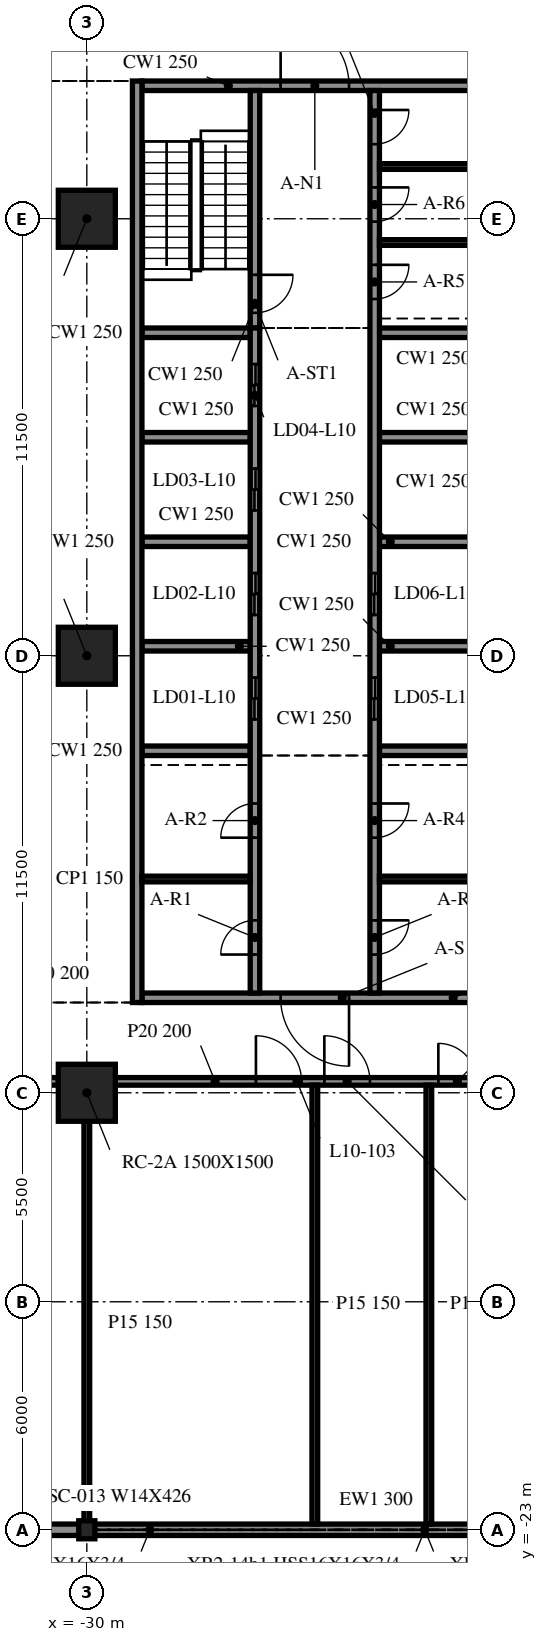
"""IFC4 building model, lengths in metres.
Left out: names, types, materials, properties, quantities, classifications, styles, units other than length and angle.
Written with IfcOpenShell. Run it as: python <this file> out.ifc"""

import sys

from ifc_helpers import new_model, si_unit, direction, frame, frame_2d, origin, origin_2d, place, context, subcontext, project, spatial, rectangle, i_section, extrude, element, fill, save


model = new_model("IFC4")
c1 = context("Model", 3, precision=1e-05, world=origin(), true_north=direction((0.0, 1.0)))
c2 = subcontext(c1, "Body", "Model", "MODEL_VIEW")
j1 = project(units=[si_unit("LENGTHUNIT", "METRE"), si_unit("PLANEANGLEUNIT", "RADIAN")], contexts=[c1])
p1 = place(None, origin())
s1 = spatial("IfcSite", under=j1, at=p1, CompositionType="ELEMENT")
p2 = place(p1, origin())
s2 = spatial("IfcBuilding", under=s1, at=p2, CompositionType="ELEMENT")
p3 = place(p2, frame((0.0, 0.0, 46.0)))
s3 = spatial("IfcBuildingStorey", under=s2, at=p3, CompositionType="ELEMENT", Elevation=46.0)
for number, where, z_axis, x_axis in (
    (1, (-30.0, -11.5, -0.34), (0.0, 0.0, 1.0), (1.0, 0.0, 0.0)),
    (2, (-30.0, 0.0, -0.34), (0.0, 0.0, 1.0), (1.0, 0.0, 0.0)),
    (3, (-30.0, 11.5, -0.34), (0.0, 0.0, 1.0), (1.0, 0.0, 0.0)),
):
    element("IfcColumn", number, at=place(p3, frame(where, z_axis=z_axis, x_axis=x_axis)), inside=s3, PredefinedType="COLUMN", context=c2, shape_type="SweptSolid", body=[
        extrude(rectangle(XDim=1.5, YDim=1.5, at=origin_2d()), origin(), (0.0, 0.0, 1.0), 4.3),
    ])
p4 = place(p3, frame((-30.0, -23.0, -0.34), z_axis=(0.0, 0.0, 1.0), x_axis=(1.0, 0.0, 0.0)))
e4 = element("IfcColumn", 4, at=p4, inside=s3, PredefinedType="COLUMN", context=c2, shape_type="SweptSolid", body=[
    extrude(i_section(OverallWidth=0.424, OverallDepth=0.475, WebThickness=0.048, FlangeThickness=0.077, at=origin_2d()), origin(), (0.0, 0.0, 1.0), 4.3),
])
p5 = place(p3, frame((-36.0, -23.0, 0.0), z_axis=(0.0, 0.0, 1.0), x_axis=(1.0, 0.0, 0.0)))
e5 = element("IfcWall", 5, at=p5, inside=s3, PredefinedType="NOTDEFINED", context=c2, shape_type="SweptSolid", body=[
    extrude(rectangle(XDim=5.976, YDim=0.3, at=frame_2d((2.988, 0.0))), origin(), (0.0, 0.0, 1.0), 3.203),
])
p6 = place(p3, frame((-29.976, -23.0, 0.0), z_axis=(0.0, 0.0, 1.0), x_axis=(1.0, 0.0, 0.0)))
e6 = element("IfcWall", 6, at=p6, inside=s3, PredefinedType="NOTDEFINED", context=c2, shape_type="SweptSolid", body=[
    extrude(rectangle(XDim=11.952, YDim=0.3, at=frame_2d((5.976, 0.0))), origin(), (0.0, 0.0, 1.0), 3.203),
])
p7 = place(p3, frame((-28.675, 15.125, 0.0), z_axis=(0.0, 0.0, 1.0), x_axis=(0.0, -1.0, 0.0)))
e7 = element("IfcWall", 7, at=p7, inside=s3, PredefinedType="SOLIDWALL", context=c2, shape_type="SweptSolid", body=[
    extrude(rectangle(XDim=24.25, YDim=0.25, at=frame_2d((12.125, 0.0))), origin(), (0.0, 0.0, 1.0), 3.96),
])
p8 = place(p3, frame((-19.45, -9.0, 0.0), z_axis=(0.0, 0.0, 1.0), x_axis=(-1.0, 0.0, 0.0)))
e8 = element("IfcWall", 8, at=p8, inside=s3, PredefinedType="SOLIDWALL", context=c2, shape_type="SweptSolid", body=[
    extrude(rectangle(XDim=9.1, YDim=0.25, at=frame_2d((4.55, 0.0))), origin(), (0.0, 0.0, 1.0), 3.96),
])
p9 = place(p8, frame((3.65, 0.0, 0.0)))
e9 = element("IfcOpeningElement", 9, at=p9, cuts=e8, PredefinedType="OPENING", context=c2, shape_type="SweptSolid", body=[
    extrude(rectangle(XDim=1.8, YDim=2.1, at=frame_2d((0.9, 1.05))), frame((0.0, 0.135, 0.0), z_axis=(0.0, -1.0, 0.0), x_axis=(1.0, 0.0, 0.0)), (0.0, 0.0, 1.0), 0.27),
])
p10 = place(p3, frame((-28.55, 15.0, 0.0), z_axis=(0.0, 0.0, 1.0), x_axis=(1.0, 0.0, 0.0)))
e10 = element("IfcWall", 10, at=p10, inside=s3, PredefinedType="SOLIDWALL", context=c2, shape_type="SweptSolid", body=[
    extrude(rectangle(XDim=9.1, YDim=0.25, at=frame_2d((4.55, 0.0))), origin(), (0.0, 0.0, 1.0), 3.96),
])
p11 = place(p10, frame((3.65, 0.0, 0.0)))
e11 = element("IfcOpeningElement", 11, at=p11, cuts=e10, PredefinedType="OPENING", context=c2, shape_type="SweptSolid", body=[
    extrude(rectangle(XDim=1.8, YDim=2.1, at=frame_2d((0.9, 1.05))), frame((0.0, 0.135, 0.0), z_axis=(0.0, -1.0, 0.0), x_axis=(1.0, 0.0, 0.0)), (0.0, 0.0, 1.0), 0.27),
])
p12 = place(p3, frame((-25.575, -8.875, 0.0), z_axis=(0.0, 0.0, 1.0), x_axis=(0.0, 1.0, 0.0)))
e12 = element("IfcWall", 12, at=p12, inside=s3, PredefinedType="SOLIDWALL", context=c2, shape_type="SweptSolid", body=[
    extrude(rectangle(XDim=17.5, YDim=0.25, at=frame_2d((8.75, 0.0))), origin(), (0.0, 0.0, 1.0), 3.96),
])
p13 = place(p12, frame((7.2, 0.0, 0.0)))
e13 = element("IfcOpeningElement", 13, at=p13, cuts=e12, PredefinedType="OPENING", context=c2, shape_type="SweptSolid", body=[
    extrude(rectangle(XDim=1.1, YDim=2.1, at=frame_2d((0.55, 1.05))), frame((0.0, 0.135, 0.0), z_axis=(0.0, -1.0, 0.0), x_axis=(1.0, 0.0, 0.0)), (0.0, 0.0, 1.0), 0.27),
])
p14 = place(p12, frame((9.95, 0.0, 0.0)))
e14 = element("IfcOpeningElement", 14, at=p14, cuts=e12, PredefinedType="OPENING", context=c2, shape_type="SweptSolid", body=[
    extrude(rectangle(XDim=1.1, YDim=2.1, at=frame_2d((0.55, 1.05))), frame((0.0, 0.135, 0.0), z_axis=(0.0, -1.0, 0.0), x_axis=(1.0, 0.0, 0.0)), (0.0, 0.0, 1.0), 0.27),
])
p15 = place(p12, frame((12.7, 0.0, 0.0)))
e15 = element("IfcOpeningElement", 15, at=p15, cuts=e12, PredefinedType="OPENING", context=c2, shape_type="SweptSolid", body=[
    extrude(rectangle(XDim=1.1, YDim=2.1, at=frame_2d((0.55, 1.05))), frame((0.0, 0.135, 0.0), z_axis=(0.0, -1.0, 0.0), x_axis=(1.0, 0.0, 0.0)), (0.0, 0.0, 1.0), 0.27),
])
p16 = place(p12, frame((15.45, 0.0, 0.0)))
e16 = element("IfcOpeningElement", 16, at=p16, cuts=e12, PredefinedType="OPENING", context=c2, shape_type="SweptSolid", body=[
    extrude(rectangle(XDim=1.1, YDim=2.1, at=frame_2d((0.55, 1.05))), frame((0.0, 0.135, 0.0), z_axis=(0.0, -1.0, 0.0), x_axis=(1.0, 0.0, 0.0)), (0.0, 0.0, 1.0), 0.27),
])
p17 = place(p12, frame((1.012, 0.0, 0.0)))
e17 = element("IfcOpeningElement", 17, at=p17, cuts=e12, PredefinedType="OPENING", context=c2, shape_type="SweptSolid", body=[
    extrude(rectangle(XDim=0.9, YDim=2.1, at=frame_2d((0.45, 1.05))), frame((0.0, 0.135, 0.0), z_axis=(0.0, -1.0, 0.0), x_axis=(1.0, 0.0, 0.0)), (0.0, 0.0, 1.0), 0.27),
])
p18 = place(p12, frame((4.087, 0.0, 0.0)))
e18 = element("IfcOpeningElement", 18, at=p18, cuts=e12, PredefinedType="OPENING", context=c2, shape_type="SweptSolid", body=[
    extrude(rectangle(XDim=0.9, YDim=2.1, at=frame_2d((0.45, 1.05))), frame((0.0, 0.135, 0.0), z_axis=(0.0, -1.0, 0.0), x_axis=(1.0, 0.0, 0.0)), (0.0, 0.0, 1.0), 0.27),
])
p19 = place(p3, frame((-25.575, 14.875, 0.0), z_axis=(0.0, 0.0, 1.0), x_axis=(0.0, -1.0, 0.0)))
e19 = element("IfcWall", 19, at=p19, inside=s3, PredefinedType="SOLIDWALL", context=c2, shape_type="SweptSolid", body=[
    extrude(rectangle(XDim=6.25, YDim=0.25, at=frame_2d((3.125, 0.0))), origin(), (0.0, 0.0, 1.0), 3.96),
])
p20 = place(p19, frame((4.85, 0.0, 0.0)))
e20 = element("IfcOpeningElement", 20, at=p20, cuts=e19, PredefinedType="OPENING", context=c2, shape_type="SweptSolid", body=[
    extrude(rectangle(XDim=1.0, YDim=2.1, at=frame_2d((0.5, 1.05))), frame((0.0, 0.135, 0.0), z_axis=(0.0, -1.0, 0.0), x_axis=(1.0, 0.0, 0.0)), (0.0, 0.0, 1.0), 0.27),
])
p21 = place(p3, frame((-22.425, 14.875, 0.0), z_axis=(0.0, 0.0, 1.0), x_axis=(0.0, -1.0, 0.0)))
e21 = element("IfcWall", 21, at=p21, inside=s3, PredefinedType="SOLIDWALL", context=c2, shape_type="SweptSolid", body=[
    extrude(rectangle(XDim=23.75, YDim=0.25, at=frame_2d((11.875, 0.0))), origin(), (0.0, 0.0, 1.0), 3.96),
])
p22 = place(p21, frame((15.45, 0.0, 0.0)))
e22 = element("IfcOpeningElement", 22, at=p22, cuts=e21, PredefinedType="OPENING", context=c2, shape_type="SweptSolid", body=[
    extrude(rectangle(XDim=1.1, YDim=2.1, at=frame_2d((0.55, 1.05))), frame((0.0, 0.135, 0.0), z_axis=(0.0, -1.0, 0.0), x_axis=(1.0, 0.0, 0.0)), (0.0, 0.0, 1.0), 0.27),
])
p23 = place(p21, frame((12.7, 0.0, 0.0)))
e23 = element("IfcOpeningElement", 23, at=p23, cuts=e21, PredefinedType="OPENING", context=c2, shape_type="SweptSolid", body=[
    extrude(rectangle(XDim=1.1, YDim=2.1, at=frame_2d((0.55, 1.05))), frame((0.0, 0.135, 0.0), z_axis=(0.0, -1.0, 0.0), x_axis=(1.0, 0.0, 0.0)), (0.0, 0.0, 1.0), 0.27),
])
p24 = place(p21, frame((21.837, 0.0, 0.0)))
e24 = element("IfcOpeningElement", 24, at=p24, cuts=e21, PredefinedType="OPENING", context=c2, shape_type="SweptSolid", body=[
    extrude(rectangle(XDim=0.9, YDim=2.1, at=frame_2d((0.45, 1.05))), frame((0.0, 0.135, 0.0), z_axis=(0.0, -1.0, 0.0), x_axis=(1.0, 0.0, 0.0)), (0.0, 0.0, 1.0), 0.27),
])
p25 = place(p21, frame((18.762, 0.0, 0.0)))
e25 = element("IfcOpeningElement", 25, at=p25, cuts=e21, PredefinedType="OPENING", context=c2, shape_type="SweptSolid", body=[
    extrude(rectangle(XDim=0.9, YDim=2.1, at=frame_2d((0.45, 1.05))), frame((0.0, 0.135, 0.0), z_axis=(0.0, -1.0, 0.0), x_axis=(1.0, 0.0, 0.0)), (0.0, 0.0, 1.0), 0.27),
])
p26 = place(p21, frame((4.587, 0.0, 0.0)))
e26 = element("IfcOpeningElement", 26, at=p26, cuts=e21, PredefinedType="OPENING", context=c2, shape_type="SweptSolid", body=[
    extrude(rectangle(XDim=0.9, YDim=2.1, at=frame_2d((0.45, 1.05))), frame((0.0, 0.135, 0.0), z_axis=(0.0, -1.0, 0.0), x_axis=(1.0, 0.0, 0.0)), (0.0, 0.0, 1.0), 0.27),
])
p27 = place(p21, frame((2.55, 0.0, 0.0)))
e27 = element("IfcOpeningElement", 27, at=p27, cuts=e21, PredefinedType="OPENING", context=c2, shape_type="SweptSolid", body=[
    extrude(rectangle(XDim=0.9, YDim=2.1, at=frame_2d((0.45, 1.05))), frame((0.0, 0.135, 0.0), z_axis=(0.0, -1.0, 0.0), x_axis=(1.0, 0.0, 0.0)), (0.0, 0.0, 1.0), 0.27),
])
p28 = place(p21, frame((0.512, 0.0, 0.0)))
e28 = element("IfcOpeningElement", 28, at=p28, cuts=e21, PredefinedType="OPENING", context=c2, shape_type="SweptSolid", body=[
    extrude(rectangle(XDim=0.9, YDim=2.1, at=frame_2d((0.45, 1.05))), frame((0.0, 0.135, 0.0), z_axis=(0.0, -1.0, 0.0), x_axis=(1.0, 0.0, 0.0)), (0.0, 0.0, 1.0), 0.27),
])
for number, where, z_axis, x_axis in (
    (29, (-28.55, -2.5, 0.0), (0.0, 0.0, 1.0), (1.0, 0.0, 0.0)),
    (30, (-28.55, 0.25, 0.0), (0.0, 0.0, 1.0), (1.0, 0.0, 0.0)),
    (31, (-28.55, 3.0, 0.0), (0.0, 0.0, 1.0), (1.0, 0.0, 0.0)),
    (32, (-28.55, 5.75, 0.0), (0.0, 0.0, 1.0), (1.0, 0.0, 0.0)),
    (33, (-28.55, 8.5, 0.0), (0.0, 0.0, 1.0), (1.0, 0.0, 0.0)),
    (34, (-22.3, -2.5, 0.0), (0.0, 0.0, 1.0), (1.0, 0.0, 0.0)),
    (35, (-22.3, 0.25, 0.0), (0.0, 0.0, 1.0), (1.0, 0.0, 0.0)),
    (36, (-22.3, 3.0, 0.0), (0.0, 0.0, 1.0), (1.0, 0.0, 0.0)),
    (37, (-22.3, 5.75, 0.0), (0.0, 0.0, 1.0), (1.0, 0.0, 0.0)),
    (38, (-22.3, 8.5, 0.0), (0.0, 0.0, 1.0), (1.0, 0.0, 0.0)),
):
    element("IfcWall", number, at=place(p3, frame(where, z_axis=z_axis, x_axis=x_axis)), inside=s3, PredefinedType="SOLIDWALL", context=c2, shape_type="SweptSolid", body=[
        extrude(rectangle(XDim=2.85, YDim=0.25, at=frame_2d((1.425, 0.0))), origin(), (0.0, 0.0, 1.0), 3.96),
    ])
for number, where, z_axis, x_axis in (
    (39, (-28.55, -5.875, 0.0), (0.0, 0.0, 1.0), (1.0, 0.0, 0.0)),
    (40, (-22.3, -5.875, 0.0), (0.0, 0.0, 1.0), (1.0, 0.0, 0.0)),
    (41, (-22.3, 10.875, 0.0), (0.0, 0.0, 1.0), (1.0, 0.0, 0.0)),
    (42, (-22.3, 12.875, 0.0), (0.0, 0.0, 1.0), (1.0, 0.0, 0.0)),
):
    element("IfcWall", number, at=place(p3, frame(where, z_axis=z_axis, x_axis=x_axis)), inside=s3, PredefinedType="PARTITIONING", context=c2, shape_type="SweptSolid", body=[
        extrude(rectangle(XDim=2.85, YDim=0.15, at=frame_2d((1.425, 0.0))), origin(), (0.0, 0.0, 1.0), 3.96),
    ])
p29 = place(p3, frame((-41.25, -11.2, 0.0), z_axis=(0.0, 0.0, 1.0), x_axis=(1.0, 0.0, 0.0)))
e43 = element("IfcWall", 43, at=p29, inside=s3, PredefinedType="PARTITIONING", context=c2, shape_type="SweptSolid", body=[
    extrude(rectangle(XDim=10.5, YDim=0.2, at=frame_2d((5.25, 0.0))), origin(), (0.0, 0.0, 1.0), 3.96),
])
p30 = place(p29, frame((3.7, 0.0, 0.0)))
e44 = element("IfcOpeningElement", 44, at=p30, cuts=e43, PredefinedType="OPENING", context=c2, shape_type="SweptSolid", body=[
    extrude(rectangle(XDim=1.2, YDim=2.1, at=frame_2d((0.6, 1.05))), frame((0.0, 0.11, 0.0), z_axis=(0.0, -1.0, 0.0), x_axis=(1.0, 0.0, 0.0)), (0.0, 0.0, 1.0), 0.22),
])
p31 = place(p29, frame((5.5, 0.0, 0.0)))
e45 = element("IfcOpeningElement", 45, at=p31, cuts=e43, PredefinedType="OPENING", context=c2, shape_type="SweptSolid", body=[
    extrude(rectangle(XDim=1.0, YDim=2.1, at=frame_2d((0.5, 1.05))), frame((0.0, 0.11, 0.0), z_axis=(0.0, -1.0, 0.0), x_axis=(1.0, 0.0, 0.0)), (0.0, 0.0, 1.0), 0.22),
])
p32 = place(p3, frame((-29.25, -11.2, 0.0), z_axis=(0.0, 0.0, 1.0), x_axis=(1.0, 0.0, 0.0)))
e46 = element("IfcWall", 46, at=p32, inside=s3, PredefinedType="PARTITIONING", context=c2, shape_type="SweptSolid", body=[
    extrude(rectangle(XDim=10.5, YDim=0.2, at=frame_2d((5.25, 0.0))), origin(), (0.0, 0.0, 1.0), 3.96),
])
p33 = place(p32, frame((3.7, 0.0, 0.0)))
e47 = element("IfcOpeningElement", 47, at=p33, cuts=e46, PredefinedType="OPENING", context=c2, shape_type="SweptSolid", body=[
    extrude(rectangle(XDim=1.2, YDim=2.1, at=frame_2d((0.6, 1.05))), frame((0.0, 0.11, 0.0), z_axis=(0.0, -1.0, 0.0), x_axis=(1.0, 0.0, 0.0)), (0.0, 0.0, 1.0), 0.22),
])
p34 = place(p32, frame((5.5, 0.0, 0.0)))
e48 = element("IfcOpeningElement", 48, at=p34, cuts=e46, PredefinedType="OPENING", context=c2, shape_type="SweptSolid", body=[
    extrude(rectangle(XDim=1.2, YDim=2.1, at=frame_2d((0.6, 1.05))), frame((0.0, 0.11, 0.0), z_axis=(0.0, -1.0, 0.0), x_axis=(1.0, 0.0, 0.0)), (0.0, 0.0, 1.0), 0.22),
])
p35 = place(p32, frame((8.5, 0.0, 0.0)))
e49 = element("IfcOpeningElement", 49, at=p35, cuts=e46, PredefinedType="OPENING", context=c2, shape_type="SweptSolid", body=[
    extrude(rectangle(XDim=1.0, YDim=2.1, at=frame_2d((0.5, 1.05))), frame((0.0, 0.11, 0.0), z_axis=(0.0, -1.0, 0.0), x_axis=(1.0, 0.0, 0.0)), (0.0, 0.0, 1.0), 0.22),
])
p36 = place(p3, frame((-30.0, -22.85, 0.0), z_axis=(0.0, 0.0, 1.0), x_axis=(0.0, 1.0, 0.0)))
e50 = element("IfcWall", 50, at=p36, inside=s3, PredefinedType="PARTITIONING", context=c2, shape_type="SweptSolid", body=[
    extrude(rectangle(XDim=10.6, YDim=0.15, at=frame_2d((5.3, 0.0))), origin(), (0.0, 0.0, 1.0), 3.96),
])
for number, where, z_axis, x_axis in (
    (51, (-24.0, -22.85, 0.0), (0.0, 0.0, 1.0), (0.0, 1.0, 0.0)),
    (52, (-21.0, -22.85, 0.0), (0.0, 0.0, 1.0), (0.0, 1.0, 0.0)),
):
    element("IfcWall", number, at=place(p3, frame(where, z_axis=z_axis, x_axis=x_axis)), inside=s3, PredefinedType="PARTITIONING", context=c2, shape_type="SweptSolid", body=[
        extrude(rectangle(XDim=11.55, YDim=0.15, at=frame_2d((5.775, 0.0))), origin(), (0.0, 0.0, 1.0), 3.96),
    ])
p37 = place(p9, origin())
e53 = element("IfcDoor", 53, at=p37, inside=s3, OperationType="DOUBLE_DOOR_SINGLE_SWING", PredefinedType="DOOR", context=c2, shape_type="SweptSolid", body=[
    extrude(rectangle(XDim=1.8, YDim=2.1, at=frame_2d((0.9, 1.05))), frame((0.0, 0.025, 0.0), z_axis=(0.0, -1.0, 0.0), x_axis=(1.0, 0.0, 0.0)), (0.0, 0.0, 1.0), 0.05),
])
fill(e9, e53)
p38 = place(p11, origin())
e54 = element("IfcDoor", 54, at=p38, inside=s3, OperationType="DOUBLE_DOOR_SINGLE_SWING", PredefinedType="DOOR", context=c2, shape_type="SweptSolid", body=[
    extrude(rectangle(XDim=1.8, YDim=2.1, at=frame_2d((0.9, 1.05))), frame((0.0, 0.025, 0.0), z_axis=(0.0, -1.0, 0.0), x_axis=(1.0, 0.0, 0.0)), (0.0, 0.0, 1.0), 0.05),
])
fill(e11, e54)
p39 = place(p22, origin())
e55 = element("IfcDoor", 55, at=p39, inside=s3, OperationType="DOUBLE_DOOR_SLIDING", PredefinedType="DOOR", context=c2, shape_type="SweptSolid", body=[
    extrude(rectangle(XDim=1.1, YDim=2.1, at=frame_2d((0.55, 1.05))), frame((0.0, 0.025, 0.0), z_axis=(0.0, -1.0, 0.0), x_axis=(1.0, 0.0, 0.0)), (0.0, 0.0, 1.0), 0.05),
])
fill(e22, e55)
p40 = place(p23, origin())
e56 = element("IfcDoor", 56, at=p40, inside=s3, OperationType="DOUBLE_DOOR_SLIDING", PredefinedType="DOOR", context=c2, shape_type="SweptSolid", body=[
    extrude(rectangle(XDim=1.1, YDim=2.1, at=frame_2d((0.55, 1.05))), frame((0.0, 0.025, 0.0), z_axis=(0.0, -1.0, 0.0), x_axis=(1.0, 0.0, 0.0)), (0.0, 0.0, 1.0), 0.05),
])
fill(e23, e56)
p41 = place(p13, origin())
e57 = element("IfcDoor", 57, at=p41, inside=s3, OperationType="DOUBLE_DOOR_SLIDING", PredefinedType="DOOR", context=c2, shape_type="SweptSolid", body=[
    extrude(rectangle(XDim=1.1, YDim=2.1, at=frame_2d((0.55, 1.05))), frame((0.0, 0.025, 0.0), z_axis=(0.0, -1.0, 0.0), x_axis=(1.0, 0.0, 0.0)), (0.0, 0.0, 1.0), 0.05),
])
fill(e13, e57)
p42 = place(p14, origin())
e58 = element("IfcDoor", 58, at=p42, inside=s3, OperationType="DOUBLE_DOOR_SLIDING", PredefinedType="DOOR", context=c2, shape_type="SweptSolid", body=[
    extrude(rectangle(XDim=1.1, YDim=2.1, at=frame_2d((0.55, 1.05))), frame((0.0, 0.025, 0.0), z_axis=(0.0, -1.0, 0.0), x_axis=(1.0, 0.0, 0.0)), (0.0, 0.0, 1.0), 0.05),
])
fill(e14, e58)
p43 = place(p15, origin())
e59 = element("IfcDoor", 59, at=p43, inside=s3, OperationType="DOUBLE_DOOR_SLIDING", PredefinedType="DOOR", context=c2, shape_type="SweptSolid", body=[
    extrude(rectangle(XDim=1.1, YDim=2.1, at=frame_2d((0.55, 1.05))), frame((0.0, 0.025, 0.0), z_axis=(0.0, -1.0, 0.0), x_axis=(1.0, 0.0, 0.0)), (0.0, 0.0, 1.0), 0.05),
])
fill(e15, e59)
p44 = place(p16, origin())
e60 = element("IfcDoor", 60, at=p44, inside=s3, OperationType="DOUBLE_DOOR_SLIDING", PredefinedType="DOOR", context=c2, shape_type="SweptSolid", body=[
    extrude(rectangle(XDim=1.1, YDim=2.1, at=frame_2d((0.55, 1.05))), frame((0.0, 0.025, 0.0), z_axis=(0.0, -1.0, 0.0), x_axis=(1.0, 0.0, 0.0)), (0.0, 0.0, 1.0), 0.05),
])
fill(e16, e60)
p45 = place(p17, origin())
e61 = element("IfcDoor", 61, at=p45, inside=s3, OperationType="SINGLE_SWING_LEFT", PredefinedType="DOOR", context=c2, shape_type="SweptSolid", body=[
    extrude(rectangle(XDim=0.9, YDim=2.1, at=frame_2d((0.45, 1.05))), frame((0.0, 0.025, 0.0), z_axis=(0.0, -1.0, 0.0), x_axis=(1.0, 0.0, 0.0)), (0.0, 0.0, 1.0), 0.05),
])
fill(e17, e61)
p46 = place(p18, origin())
e62 = element("IfcDoor", 62, at=p46, inside=s3, OperationType="SINGLE_SWING_RIGHT", PredefinedType="DOOR", context=c2, shape_type="SweptSolid", body=[
    extrude(rectangle(XDim=0.9, YDim=2.1, at=frame_2d((0.45, 1.05))), frame((0.0, 0.025, 0.0), z_axis=(0.0, -1.0, 0.0), x_axis=(1.0, 0.0, 0.0)), (0.0, 0.0, 1.0), 0.05),
])
fill(e18, e62)
p47 = place(p24, origin())
e63 = element("IfcDoor", 63, at=p47, inside=s3, OperationType="SINGLE_SWING_LEFT", PredefinedType="DOOR", context=c2, shape_type="SweptSolid", body=[
    extrude(rectangle(XDim=0.9, YDim=2.1, at=frame_2d((0.45, 1.05))), frame((0.0, 0.025, 0.0), z_axis=(0.0, -1.0, 0.0), x_axis=(1.0, 0.0, 0.0)), (0.0, 0.0, 1.0), 0.05),
])
fill(e24, e63)
p48 = place(p25, origin())
e64 = element("IfcDoor", 64, at=p48, inside=s3, OperationType="SINGLE_SWING_RIGHT", PredefinedType="DOOR", context=c2, shape_type="SweptSolid", body=[
    extrude(rectangle(XDim=0.9, YDim=2.1, at=frame_2d((0.45, 1.05))), frame((0.0, 0.025, 0.0), z_axis=(0.0, -1.0, 0.0), x_axis=(1.0, 0.0, 0.0)), (0.0, 0.0, 1.0), 0.05),
])
fill(e25, e64)
p49 = place(p26, origin())
e65 = element("IfcDoor", 65, at=p49, inside=s3, OperationType="SINGLE_SWING_LEFT", PredefinedType="DOOR", context=c2, shape_type="SweptSolid", body=[
    extrude(rectangle(XDim=0.9, YDim=2.1, at=frame_2d((0.45, 1.05))), frame((0.0, 0.025, 0.0), z_axis=(0.0, -1.0, 0.0), x_axis=(1.0, 0.0, 0.0)), (0.0, 0.0, 1.0), 0.05),
])
fill(e26, e65)
p50 = place(p27, origin())
e66 = element("IfcDoor", 66, at=p50, inside=s3, OperationType="SINGLE_SWING_RIGHT", PredefinedType="DOOR", context=c2, shape_type="SweptSolid", body=[
    extrude(rectangle(XDim=0.9, YDim=2.1, at=frame_2d((0.45, 1.05))), frame((0.0, 0.025, 0.0), z_axis=(0.0, -1.0, 0.0), x_axis=(1.0, 0.0, 0.0)), (0.0, 0.0, 1.0), 0.05),
])
fill(e27, e66)
p51 = place(p28, origin())
e67 = element("IfcDoor", 67, at=p51, inside=s3, OperationType="SINGLE_SWING_LEFT", PredefinedType="DOOR", context=c2, shape_type="SweptSolid", body=[
    extrude(rectangle(XDim=0.9, YDim=2.1, at=frame_2d((0.45, 1.05))), frame((0.0, 0.025, 0.0), z_axis=(0.0, -1.0, 0.0), x_axis=(1.0, 0.0, 0.0)), (0.0, 0.0, 1.0), 0.05),
])
fill(e28, e67)
p52 = place(p20, origin())
e68 = element("IfcDoor", 68, at=p52, inside=s3, OperationType="SINGLE_SWING_RIGHT", PredefinedType="DOOR", context=c2, shape_type="SweptSolid", body=[
    extrude(rectangle(XDim=1.0, YDim=2.1, at=frame_2d((0.5, 1.05))), frame((0.0, 0.025, 0.0), z_axis=(0.0, -1.0, 0.0), x_axis=(1.0, 0.0, 0.0)), (0.0, 0.0, 1.0), 0.05),
])
fill(e20, e68)
p53 = place(p33, origin())
e69 = element("IfcDoor", 69, at=p53, inside=s3, OperationType="SINGLE_SWING_RIGHT", PredefinedType="DOOR", context=c2, shape_type="SweptSolid", body=[
    extrude(rectangle(XDim=1.2, YDim=2.1, at=frame_2d((0.6, 1.05))), frame((0.0, 0.025, 0.0), z_axis=(0.0, -1.0, 0.0), x_axis=(1.0, 0.0, 0.0)), (0.0, 0.0, 1.0), 0.05),
])
fill(e47, e69)
p54 = place(p34, origin())
e70 = element("IfcDoor", 70, at=p54, inside=s3, OperationType="SINGLE_SWING_LEFT", PredefinedType="DOOR", context=c2, shape_type="SweptSolid", body=[
    extrude(rectangle(XDim=1.2, YDim=2.1, at=frame_2d((0.6, 1.05))), frame((0.0, 0.025, 0.0), z_axis=(0.0, -1.0, 0.0), x_axis=(1.0, 0.0, 0.0)), (0.0, 0.0, 1.0), 0.05),
])
fill(e48, e70)
p55 = place(p35, origin())
e71 = element("IfcDoor", 71, at=p55, inside=s3, OperationType="SINGLE_SWING_LEFT", PredefinedType="DOOR", context=c2, shape_type="SweptSolid", body=[
    extrude(rectangle(XDim=1.0, YDim=2.1, at=frame_2d((0.5, 1.05))), frame((0.0, 0.025, 0.0), z_axis=(0.0, -1.0, 0.0), x_axis=(1.0, 0.0, 0.0)), (0.0, 0.0, 1.0), 0.05),
])
fill(e49, e71)
save(model, sys.argv[1])
